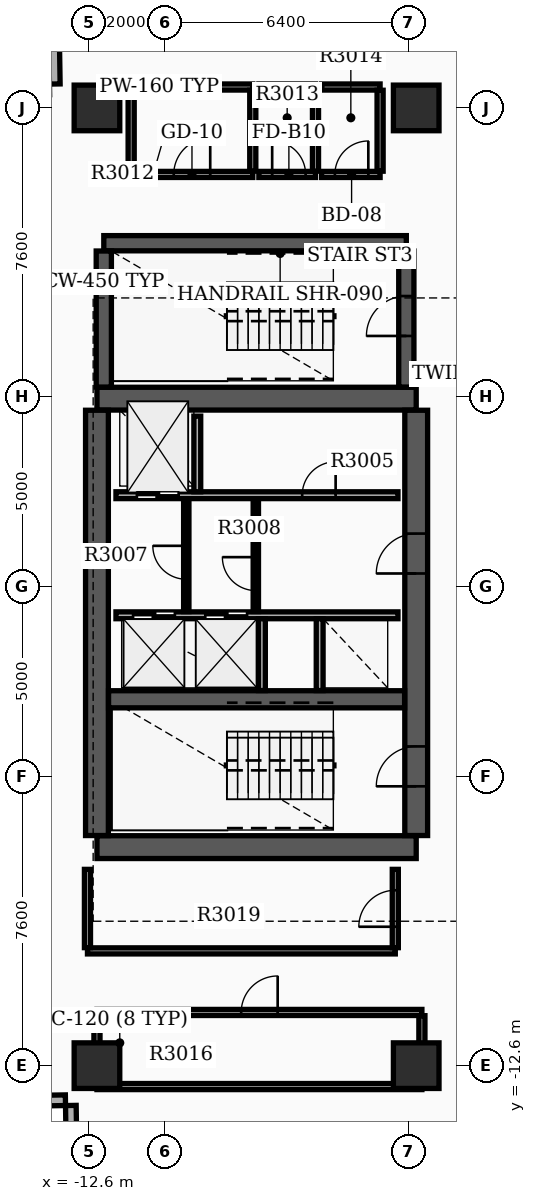
"""IFC4 building model, lengths in metres.
Left out: names, types, materials, properties, quantities, classifications, styles, units other than length and angle.
Written with IfcOpenShell. Run it as: python <this file> out.ifc"""

import sys

from ifc_helpers import new_model, si_unit, direction, frame, frame_2d, origin, origin_2d, place, context, subcontext, project, spatial, rectangle, extrude, element, fill, save


model = new_model("IFC4")
c1 = context("Model", 3, precision=1e-05, world=origin(), true_north=direction((0.0, 1.0)))
c2 = subcontext(c1, "Body", "Model", "MODEL_VIEW")
j1 = project(units=[si_unit("LENGTHUNIT", "METRE"), si_unit("PLANEANGLEUNIT", "RADIAN")], contexts=[c1])
p1 = place(None, origin())
s1 = spatial("IfcSite", under=j1, at=p1, CompositionType="ELEMENT")
p2 = place(p1, origin())
s2 = spatial("IfcBuilding", under=s1, at=p2, CompositionType="ELEMENT")
p3 = place(p2, frame((0.0, 0.0, 187.8)))
s3 = spatial("IfcBuildingStorey", under=s2, at=p3, CompositionType="ELEMENT", Elevation=187.8)
for number, where, z_axis, x_axis in (
    (1, (-12.4, -6.85, 0.0), (0.0, 0.0, 1.0), (1.0, 0.0, 0.0)),
    (2, (-12.4, 4.95, 0.0), (0.0, 0.0, 1.0), (1.0, 0.0, 0.0)),
):
    element("IfcWall", number, at=place(p3, frame(where, z_axis=z_axis, x_axis=x_axis)), inside=s3, PredefinedType="SHEAR", context=c2, shape_type="SweptSolid", body=[
        extrude(rectangle(XDim=8.4, YDim=0.6, at=frame_2d((4.2, 0.0))), origin(), (0.0, 0.0, 1.0), 3.65),
    ])
p4 = place(p3, frame((-12.4, -6.545, 0.0), z_axis=(0.0, 0.0, 1.0), x_axis=(0.0, 1.0, 0.0)))
e3 = element("IfcWall", 3, at=p4, inside=s3, PredefinedType="SHEAR", context=c2, shape_type="SweptSolid", body=[
    extrude(rectangle(XDim=11.19, YDim=0.6, at=frame_2d((5.595, 0.0))), origin(), (0.0, 0.0, 1.0), 3.65),
])
p5 = place(p3, frame((-4.0, -6.545, 0.0), z_axis=(0.0, 0.0, 1.0), x_axis=(0.0, 1.0, 0.0)))
e4 = element("IfcWall", 4, at=p5, inside=s3, PredefinedType="SHEAR", context=c2, shape_type="SweptSolid", body=[
    extrude(rectangle(XDim=11.19, YDim=0.6, at=frame_2d((5.595, 0.0))), origin(), (0.0, 0.0, 1.0), 3.65),
])
p6 = place(p5, frame((1.295, 0.0, 0.0)))
e5 = element("IfcOpeningElement", 5, at=p6, cuts=e4, PredefinedType="OPENING", context=c2, shape_type="SweptSolid", body=[
    extrude(rectangle(XDim=1.05, YDim=2.15, at=frame_2d((0.525, 1.075))), frame((0.0, 0.31, 0.0), z_axis=(0.0, -1.0, 0.0), x_axis=(1.0, 0.0, 0.0)), (0.0, 0.0, 1.0), 0.62),
])
p7 = place(p5, frame((6.895, 0.0, 0.0)))
e6 = element("IfcOpeningElement", 6, at=p7, cuts=e4, PredefinedType="OPENING", context=c2, shape_type="SweptSolid", body=[
    extrude(rectangle(XDim=1.05, YDim=2.15, at=frame_2d((0.525, 1.075))), frame((0.0, 0.31, 0.0), z_axis=(0.0, -1.0, 0.0), x_axis=(1.0, 0.0, 0.0)), (0.0, 0.0, 1.0), 0.62),
])
p8 = place(p3, frame((-12.095, -2.96, 0.0), z_axis=(0.0, 0.0, 1.0), x_axis=(1.0, 0.0, 0.0)))
e7 = element("IfcWall", 7, at=p8, inside=s3, PredefinedType="SHEAR", context=c2, shape_type="SweptSolid", body=[
    extrude(rectangle(XDim=7.79, YDim=0.45, at=frame_2d((3.895, 0.0))), origin(), (0.0, 0.0, 1.0), 3.65),
])
p9 = place(p3, frame((-12.22, 9.04, 0.0), z_axis=(0.0, 0.0, 1.0), x_axis=(1.0, 0.0, 0.0)))
e8 = element("IfcWall", 8, at=p9, inside=s3, PredefinedType="SHEAR", context=c2, shape_type="SweptSolid", body=[
    extrude(rectangle(XDim=7.96, YDim=0.4, at=frame_2d((3.98, 0.0))), origin(), (0.0, 0.0, 1.0), 3.65),
])
p10 = place(p3, frame((-12.22, 5.255, 0.0), z_axis=(0.0, 0.0, 1.0), x_axis=(0.0, 1.0, 0.0)))
e9 = element("IfcWall", 9, at=p10, inside=s3, PredefinedType="SHEAR", context=c2, shape_type="SweptSolid", body=[
    extrude(rectangle(XDim=3.58, YDim=0.4, at=frame_2d((1.79, 0.0))), origin(), (0.0, 0.0, 1.0), 3.65),
])
p11 = place(p3, frame((-4.26, 5.255, 0.0), z_axis=(0.0, 0.0, 1.0), x_axis=(0.0, 1.0, 0.0)))
e10 = element("IfcWall", 10, at=p11, inside=s3, PredefinedType="SHEAR", context=c2, shape_type="SweptSolid", body=[
    extrude(rectangle(XDim=3.58, YDim=0.4, at=frame_2d((1.79, 0.0))), origin(), (0.0, 0.0, 1.0), 3.65),
])
p12 = place(p11, frame((1.345, 0.0, 0.0)))
e11 = element("IfcOpeningElement", 11, at=p12, cuts=e10, PredefinedType="OPENING", context=c2, shape_type="SweptSolid", body=[
    extrude(rectangle(XDim=1.05, YDim=2.15, at=frame_2d((0.525, 1.075))), frame((0.0, 0.21, 0.0), z_axis=(0.0, -1.0, 0.0), x_axis=(1.0, 0.0, 0.0)), (0.0, 0.0, 1.0), 0.42),
])
for number, where, z_axis, x_axis in (
    (12, (-12.4, -12.6, 0.0), (0.0, 0.0, 1.0), (1.0, 0.0, 0.0)),
    (13, (-12.4, 12.6, 0.0), (0.0, 0.0, 1.0), (1.0, 0.0, 0.0)),
    (14, (-4.0, -12.6, 0.0), (0.0, 0.0, 1.0), (1.0, 0.0, 0.0)),
    (15, (-4.0, 12.6, 0.0), (0.0, 0.0, 1.0), (1.0, 0.0, 0.0)),
):
    element("IfcColumn", number, at=place(p3, frame(where, z_axis=z_axis, x_axis=x_axis)), inside=s3, PredefinedType="COLUMN", context=c2, shape_type="SweptSolid", body=[
        extrude(rectangle(XDim=1.2, YDim=1.2, at=origin_2d()), origin(), (0.0, 0.0, 1.0), 3.9),
    ])
p13 = place(p3, frame((-13.51, 13.229, 0.0), z_axis=(0.0, 0.0, 1.0), x_axis=(-0.015625635615, 0.999877912303, 0.0)))
e16 = element("IfcWall", 16, at=p13, inside=s3, PredefinedType="STANDARD", context=c2, shape_type="SweptSolid", body=[
    extrude(rectangle(XDim=1.5, YDim=0.28, at=frame_2d((0.75, 0.0))), origin(), (0.0, 0.0, 1.0), 2.92),
])
p14 = place(p3, frame((-14.449, -13.529, 0.0), z_axis=(0.0, 0.0, 1.0), x_axis=(0.999878147354, 0.015610587569, 0.0)))
e17 = element("IfcWall", 17, at=p14, inside=s3, PredefinedType="STANDARD", context=c2, shape_type="SweptSolid", body=[
    extrude(rectangle(XDim=1.22, YDim=0.28, at=frame_2d((0.61, 0.0))), origin(), (0.0, 0.0, 1.0), 2.92),
])
p15 = place(p3, frame((-13.087, -13.647, 0.0), z_axis=(0.0, 0.0, 1.0), x_axis=(0.015785793208, -0.999875396603, 0.0)))
e18 = element("IfcWall", 18, at=p15, inside=s3, PredefinedType="STANDARD", context=c2, shape_type="SweptSolid", body=[
    extrude(rectangle(XDim=1.5, YDim=0.28, at=frame_2d((0.75, 0.0))), origin(), (0.0, 0.0, 1.0), 2.92),
])
p16 = place(p3, frame((-11.9, 2.41, 0.0), z_axis=(0.0, 0.0, 1.0), x_axis=(1.0, 0.0, 0.0)))
e19 = element("IfcWall", 19, at=p16, inside=s3, PredefinedType="SOLIDWALL", context=c2, shape_type="SweptSolid", body=[
    extrude(rectangle(XDim=7.42, YDim=0.18, at=frame_2d((3.71, 0.0))), origin(), (0.0, 0.0, 1.0), 2.91),
])
p17 = place(p16, frame((0.55, 0.0, 0.0)))
e20 = element("IfcOpeningElement", 20, at=p17, cuts=e19, PredefinedType="OPENING", context=c2, shape_type="SweptSolid", body=[
    extrude(rectangle(XDim=1.1, YDim=2.15, at=frame_2d((0.55, 1.075))), frame((0.0, 0.1, 0.0), z_axis=(0.0, -1.0, 0.0), x_axis=(1.0, 0.0, 0.0)), (0.0, 0.0, 1.0), 0.2),
])
p18 = place(p16, frame((4.9, 0.0, 0.0)))
e21 = element("IfcOpeningElement", 21, at=p18, cuts=e19, PredefinedType="OPENING", context=c2, shape_type="SweptSolid", body=[
    extrude(rectangle(XDim=0.88, YDim=2.1, at=frame_2d((0.44, 1.05))), frame((0.0, 0.1, 0.0), z_axis=(0.0, -1.0, 0.0), x_axis=(1.0, 0.0, 0.0)), (0.0, 0.0, 1.0), 0.2),
])
p19 = place(p3, frame((-11.9, -0.75, 0.0), z_axis=(0.0, 0.0, 1.0), x_axis=(1.0, 0.0, 0.0)))
e22 = element("IfcWall", 22, at=p19, inside=s3, PredefinedType="SOLIDWALL", context=c2, shape_type="SweptSolid", body=[
    extrude(rectangle(XDim=7.42, YDim=0.18, at=frame_2d((3.71, 0.0))), origin(), (0.0, 0.0, 1.0), 2.91),
])
p20 = place(p19, frame((0.45, 0.0, 0.0)))
e23 = element("IfcOpeningElement", 23, at=p20, cuts=e22, PredefinedType="OPENING", context=c2, shape_type="SweptSolid", body=[
    extrude(rectangle(XDim=1.1, YDim=2.15, at=frame_2d((0.55, 1.075))), frame((0.0, 0.1, 0.0), z_axis=(0.0, -1.0, 0.0), x_axis=(1.0, 0.0, 0.0)), (0.0, 0.0, 1.0), 0.2),
])
p21 = place(p19, frame((2.35, 0.0, 0.0)))
e24 = element("IfcOpeningElement", 24, at=p21, cuts=e22, PredefinedType="OPENING", context=c2, shape_type="SweptSolid", body=[
    extrude(rectangle(XDim=1.1, YDim=2.15, at=frame_2d((0.55, 1.075))), frame((0.0, 0.1, 0.0), z_axis=(0.0, -1.0, 0.0), x_axis=(1.0, 0.0, 0.0)), (0.0, 0.0, 1.0), 0.2),
])
p22 = place(p3, frame((-9.76, 2.5, 0.0), z_axis=(0.0, 0.0, 1.0), x_axis=(0.0, 1.0, 0.0)))
e25 = element("IfcWall", 25, at=p22, inside=s3, PredefinedType="SOLIDWALL", context=c2, shape_type="SweptSolid", body=[
    extrude(rectangle(XDim=1.99, YDim=0.18, at=frame_2d((0.995, 0.0))), origin(), (0.0, 0.0, 1.0), 2.91),
])
for number, where, z_axis, x_axis in (
    (26, (-8.06, -2.73, 0.0), (0.0, 0.0, 1.0), (0.0, 1.0, 0.0)),
    (27, (-6.54, -2.73, 0.0), (0.0, 0.0, 1.0), (0.0, 1.0, 0.0)),
):
    element("IfcWall", number, at=place(p3, frame(where, z_axis=z_axis, x_axis=x_axis)), inside=s3, PredefinedType="SOLIDWALL", context=c2, shape_type="SweptSolid", body=[
        extrude(rectangle(XDim=1.89, YDim=0.18, at=frame_2d((0.945, 0.0))), origin(), (0.0, 0.0, 1.0), 2.91),
    ])
p23 = place(p3, frame((-8.22, -0.65, 0.0), z_axis=(0.0, 0.0, 1.0), x_axis=(0.0, 1.0, 0.0)))
e28 = element("IfcWall", 28, at=p23, inside=s3, PredefinedType="SOLIDWALL", context=c2, shape_type="SweptSolid", body=[
    extrude(rectangle(XDim=2.96, YDim=0.14, at=frame_2d((1.48, 0.0))), origin(), (0.0, 0.0, 1.0), 2.91),
])
p24 = place(p23, frame((0.55, 0.0, 0.0)))
e29 = element("IfcOpeningElement", 29, at=p24, cuts=e28, PredefinedType="OPENING", context=c2, shape_type="SweptSolid", body=[
    extrude(rectangle(XDim=0.88, YDim=2.1, at=frame_2d((0.44, 1.05))), frame((0.0, 0.08, 0.0), z_axis=(0.0, -1.0, 0.0), x_axis=(1.0, 0.0, 0.0)), (0.0, 0.0, 1.0), 0.16),
])
p25 = place(p3, frame((-10.05, -0.652, 0.0), z_axis=(0.0, 0.0, 1.0), x_axis=(0.0, 1.0, 0.0)))
e30 = element("IfcWall", 30, at=p25, inside=s3, PredefinedType="PARTITIONING", context=c2, shape_type="SweptSolid", body=[
    extrude(rectangle(XDim=2.962, YDim=0.14, at=frame_2d((1.481, 0.0))), origin(), (0.0, 0.0, 1.0), 2.91),
])
p26 = place(p25, frame((0.85, 0.0, 0.0)))
e31 = element("IfcOpeningElement", 31, at=p26, cuts=e30, PredefinedType="OPENING", context=c2, shape_type="SweptSolid", body=[
    extrude(rectangle(XDim=0.88, YDim=2.1, at=frame_2d((0.44, 1.05))), frame((0.0, 0.08, 0.0), z_axis=(0.0, -1.0, 0.0), x_axis=(1.0, 0.0, 0.0)), (0.0, 0.0, 1.0), 0.16),
])
p27 = place(p3, frame((-11.5, 10.85, 0.0), z_axis=(0.0, 0.0, 1.0), x_axis=(1.0, 0.0, 0.0)))
e32 = element("IfcWall", 32, at=p27, inside=s3, PredefinedType="PARTITIONING", context=c2, shape_type="SweptSolid", body=[
    extrude(rectangle(XDim=3.2, YDim=0.16, at=frame_2d((1.6, 0.0))), origin(), (0.0, 0.0, 1.0), 2.91),
])
p28 = place(p27, frame((1.12, 0.0, 0.0)))
e33 = element("IfcOpeningElement", 33, at=p28, cuts=e32, PredefinedType="OPENING", context=c2, shape_type="SweptSolid", body=[
    extrude(rectangle(XDim=0.96, YDim=2.15, at=frame_2d((0.48, 1.075))), frame((0.0, 0.09, 0.0), z_axis=(0.0, -1.0, 0.0), x_axis=(1.0, 0.0, 0.0)), (0.0, 0.0, 1.0), 0.18),
])
p29 = place(p3, frame((-11.5, 13.15, 0.0), z_axis=(0.0, 0.0, 1.0), x_axis=(1.0, 0.0, 0.0)))
e34 = element("IfcWall", 34, at=p29, inside=s3, PredefinedType="PARTITIONING", context=c2, shape_type="SweptSolid", body=[
    extrude(rectangle(XDim=3.2, YDim=0.16, at=frame_2d((1.6, 0.0))), origin(), (0.0, 0.0, 1.0), 2.91),
])
for number, where, z_axis, x_axis in (
    (35, (-11.5, 10.935, 0.0), (0.0, 0.0, 1.0), (0.0, 1.0, 0.0)),
    (36, (-8.3, 10.935, 0.0), (0.0, 0.0, 1.0), (0.0, 1.0, 0.0)),
):
    element("IfcWall", number, at=place(p3, frame(where, z_axis=z_axis, x_axis=x_axis)), inside=s3, PredefinedType="PARTITIONING", context=c2, shape_type="SweptSolid", body=[
        extrude(rectangle(XDim=2.13, YDim=0.16, at=frame_2d((1.065, 0.0))), origin(), (0.0, 0.0, 1.0), 2.91),
    ])
p30 = place(p3, frame((-8.14, 10.85, 0.0), z_axis=(0.0, 0.0, 1.0), x_axis=(1.0, 0.0, 0.0)))
e37 = element("IfcWall", 37, at=p30, inside=s3, PredefinedType="PARTITIONING", context=c2, shape_type="SweptSolid", body=[
    extrude(rectangle(XDim=1.49, YDim=0.16, at=frame_2d((0.745, 0.0))), origin(), (0.0, 0.0, 1.0), 2.91),
])
p31 = place(p30, frame((0.35, 0.0, 0.0)))
e38 = element("IfcOpeningElement", 38, at=p31, cuts=e37, PredefinedType="OPENING", context=c2, shape_type="SweptSolid", body=[
    extrude(rectangle(XDim=0.88, YDim=2.1, at=frame_2d((0.44, 1.05))), frame((0.0, 0.09, 0.0), z_axis=(0.0, -1.0, 0.0), x_axis=(1.0, 0.0, 0.0)), (0.0, 0.0, 1.0), 0.18),
])
p32 = place(p3, frame((-8.14, 13.15, 0.0), z_axis=(0.0, 0.0, 1.0), x_axis=(1.0, 0.0, 0.0)))
e39 = element("IfcWall", 39, at=p32, inside=s3, PredefinedType="PARTITIONING", context=c2, shape_type="SweptSolid", body=[
    extrude(rectangle(XDim=1.49, YDim=0.16, at=frame_2d((0.745, 0.0))), origin(), (0.0, 0.0, 1.0), 2.91),
])
p33 = place(p3, frame((-6.65, 10.935, 0.0), z_axis=(0.0, 0.0, 1.0), x_axis=(0.0, 1.0, 0.0)))
e40 = element("IfcWall", 40, at=p33, inside=s3, PredefinedType="PARTITIONING", context=c2, shape_type="SweptSolid", body=[
    extrude(rectangle(XDim=2.13, YDim=0.16, at=frame_2d((1.065, 0.0))), origin(), (0.0, 0.0, 1.0), 2.91),
])
p34 = place(p3, frame((-6.49, 10.85, 0.0), z_axis=(0.0, 0.0, 1.0), x_axis=(1.0, 0.0, 0.0)))
e41 = element("IfcWall", 41, at=p34, inside=s3, PredefinedType="PARTITIONING", context=c2, shape_type="SweptSolid", body=[
    extrude(rectangle(XDim=1.54, YDim=0.16, at=frame_2d((0.77, 0.0))), origin(), (0.0, 0.0, 1.0), 2.91),
])
p35 = place(p34, frame((0.35, 0.0, 0.0)))
e42 = element("IfcOpeningElement", 42, at=p35, cuts=e41, PredefinedType="OPENING", context=c2, shape_type="SweptSolid", body=[
    extrude(rectangle(XDim=0.88, YDim=2.15, at=frame_2d((0.44, 1.075))), frame((0.0, 0.09, 0.0), z_axis=(0.0, -1.0, 0.0), x_axis=(1.0, 0.0, 0.0)), (0.0, 0.0, 1.0), 0.18),
])
p36 = place(p3, frame((-6.49, 13.15, 0.0), z_axis=(0.0, 0.0, 1.0), x_axis=(1.0, 0.0, 0.0)))
e43 = element("IfcWall", 43, at=p36, inside=s3, PredefinedType="PARTITIONING", context=c2, shape_type="SweptSolid", body=[
    extrude(rectangle(XDim=1.54, YDim=0.16, at=frame_2d((0.77, 0.0))), origin(), (0.0, 0.0, 1.0), 2.91),
])
p37 = place(p3, frame((-4.95, 10.935, 0.0), z_axis=(0.0, 0.0, 1.0), x_axis=(0.0, 1.0, 0.0)))
e44 = element("IfcWall", 44, at=p37, inside=s3, PredefinedType="PARTITIONING", context=c2, shape_type="SweptSolid", body=[
    extrude(rectangle(XDim=2.13, YDim=0.16, at=frame_2d((1.065, 0.0))), origin(), (0.0, 0.0, 1.0), 2.91),
])
p38 = place(p3, frame((-12.4, -13.15, 0.0), z_axis=(0.0, 0.0, 1.0), x_axis=(1.0, 0.0, 0.0)))
e45 = element("IfcWall", 45, at=p38, inside=s3, PredefinedType="PARTITIONING", context=c2, shape_type="SweptSolid", body=[
    extrude(rectangle(XDim=8.55, YDim=0.16, at=frame_2d((4.275, 0.0))), origin(), (0.0, 0.0, 1.0), 2.91),
])
p39 = place(p3, frame((-12.4, -11.2, 0.0), z_axis=(0.0, 0.0, 1.0), x_axis=(1.0, 0.0, 0.0)))
e46 = element("IfcWall", 46, at=p39, inside=s3, PredefinedType="PARTITIONING", context=c2, shape_type="SweptSolid", body=[
    extrude(rectangle(XDim=8.55, YDim=0.16, at=frame_2d((4.275, 0.0))), origin(), (0.0, 0.0, 1.0), 2.91),
])
p40 = place(p39, frame((3.795, 0.0, 0.0)))
e47 = element("IfcOpeningElement", 47, at=p40, cuts=e46, PredefinedType="OPENING", context=c2, shape_type="SweptSolid", body=[
    extrude(rectangle(XDim=0.96, YDim=2.15, at=frame_2d((0.48, 1.075))), frame((0.0, 0.09, 0.0), z_axis=(0.0, -1.0, 0.0), x_axis=(1.0, 0.0, 0.0)), (0.0, 0.0, 1.0), 0.18),
])
for number, where, z_axis, x_axis in (
    (48, (-12.4, -13.065, 0.0), (0.0, 0.0, 1.0), (0.0, 1.0, 0.0)),
    (49, (-3.85, -13.065, 0.0), (0.0, 0.0, 1.0), (0.0, 1.0, 0.0)),
):
    element("IfcWall", number, at=place(p3, frame(where, z_axis=z_axis, x_axis=x_axis)), inside=s3, PredefinedType="PARTITIONING", context=c2, shape_type="SweptSolid", body=[
        extrude(rectangle(XDim=1.78, YDim=0.16, at=frame_2d((0.89, 0.0))), origin(), (0.0, 0.0, 1.0), 2.91),
    ])
p41 = place(p3, frame((-12.65, -9.58, 0.0), z_axis=(0.0, 0.0, 1.0), x_axis=(1.0, 0.0, 0.0)))
e50 = element("IfcWall", 50, at=p41, inside=s3, PredefinedType="PARTITIONING", context=c2, shape_type="SweptSolid", body=[
    extrude(rectangle(XDim=8.1, YDim=0.16, at=frame_2d((4.05, 0.0))), origin(), (0.0, 0.0, 1.0), 2.91),
])
p42 = place(p3, frame((-12.65, -9.495, 0.0), z_axis=(0.0, 0.0, 1.0), x_axis=(0.0, 1.0, 0.0)))
e51 = element("IfcWall", 51, at=p42, inside=s3, PredefinedType="PARTITIONING", context=c2, shape_type="SweptSolid", body=[
    extrude(rectangle(XDim=2.06, YDim=0.16, at=frame_2d((1.03, 0.0))), origin(), (0.0, 0.0, 1.0), 2.91),
])
p43 = place(p3, frame((-4.55, -9.495, 0.0), z_axis=(0.0, 0.0, 1.0), x_axis=(0.0, 1.0, 0.0)))
e52 = element("IfcWall", 52, at=p43, inside=s3, PredefinedType="PARTITIONING", context=c2, shape_type="SweptSolid", body=[
    extrude(rectangle(XDim=2.06, YDim=0.16, at=frame_2d((1.03, 0.0))), origin(), (0.0, 0.0, 1.0), 2.91),
])
p44 = place(p43, frame((0.55, 0.0, 0.0)))
e53 = element("IfcOpeningElement", 53, at=p44, cuts=e52, PredefinedType="OPENING", context=c2, shape_type="SweptSolid", body=[
    extrude(rectangle(XDim=0.96, YDim=2.15, at=frame_2d((0.48, 1.075))), frame((0.0, 0.09, 0.0), z_axis=(0.0, -1.0, 0.0), x_axis=(1.0, 0.0, 0.0)), (0.0, 0.0, 1.0), 0.18),
])
p45 = place(p6, origin())
e54 = element("IfcDoor", 54, at=p45, inside=s3, OperationType="SINGLE_SWING_LEFT", PredefinedType="DOOR", context=c2, shape_type="SweptSolid", body=[
    extrude(rectangle(XDim=1.05, YDim=2.15, at=frame_2d((0.525, 1.075))), frame((0.0, 0.025, 0.0), z_axis=(0.0, -1.0, 0.0), x_axis=(1.0, 0.0, 0.0)), (0.0, 0.0, 1.0), 0.05),
])
fill(e5, e54)
p46 = place(p7, origin())
e55 = element("IfcDoor", 55, at=p46, inside=s3, OperationType="SINGLE_SWING_LEFT", PredefinedType="DOOR", context=c2, shape_type="SweptSolid", body=[
    extrude(rectangle(XDim=1.05, YDim=2.15, at=frame_2d((0.525, 1.075))), frame((0.0, 0.025, 0.0), z_axis=(0.0, -1.0, 0.0), x_axis=(1.0, 0.0, 0.0)), (0.0, 0.0, 1.0), 0.05),
])
fill(e6, e55)
p47 = place(p12, origin())
e56 = element("IfcDoor", 56, at=p47, inside=s3, OperationType="SINGLE_SWING_LEFT", PredefinedType="DOOR", context=c2, shape_type="SweptSolid", body=[
    extrude(rectangle(XDim=1.05, YDim=2.15, at=frame_2d((0.525, 1.075))), frame((0.0, 0.025, 0.0), z_axis=(0.0, -1.0, 0.0), x_axis=(1.0, 0.0, 0.0)), (0.0, 0.0, 1.0), 0.05),
])
fill(e11, e56)
p48 = place(p17, origin())
e57 = element("IfcDoor", 57, at=p48, inside=s3, OperationType="DOUBLE_DOOR_SLIDING", PredefinedType="DOOR", context=c2, shape_type="SweptSolid", body=[
    extrude(rectangle(XDim=1.1, YDim=2.15, at=frame_2d((0.55, 1.075))), frame((0.0, 0.025, 0.0), z_axis=(0.0, -1.0, 0.0), x_axis=(1.0, 0.0, 0.0)), (0.0, 0.0, 1.0), 0.05),
])
fill(e20, e57)
p49 = place(p20, origin())
e58 = element("IfcDoor", 58, at=p49, inside=s3, OperationType="DOUBLE_DOOR_SLIDING", PredefinedType="DOOR", context=c2, shape_type="SweptSolid", body=[
    extrude(rectangle(XDim=1.1, YDim=2.15, at=frame_2d((0.55, 1.075))), frame((0.0, 0.025, 0.0), z_axis=(0.0, -1.0, 0.0), x_axis=(1.0, 0.0, 0.0)), (0.0, 0.0, 1.0), 0.05),
])
fill(e23, e58)
p50 = place(p21, origin())
e59 = element("IfcDoor", 59, at=p50, inside=s3, OperationType="DOUBLE_DOOR_SLIDING", PredefinedType="DOOR", context=c2, shape_type="SweptSolid", body=[
    extrude(rectangle(XDim=1.1, YDim=2.15, at=frame_2d((0.55, 1.075))), frame((0.0, 0.025, 0.0), z_axis=(0.0, -1.0, 0.0), x_axis=(1.0, 0.0, 0.0)), (0.0, 0.0, 1.0), 0.05),
])
fill(e24, e59)
p51 = place(p18, origin())
e60 = element("IfcDoor", 60, at=p51, inside=s3, OperationType="SINGLE_SWING_RIGHT", PredefinedType="DOOR", context=c2, shape_type="SweptSolid", body=[
    extrude(rectangle(XDim=0.88, YDim=2.1, at=frame_2d((0.44, 1.05))), frame((0.0, 0.025, 0.0), z_axis=(0.0, -1.0, 0.0), x_axis=(1.0, 0.0, 0.0)), (0.0, 0.0, 1.0), 0.05),
])
fill(e21, e60)
p52 = place(p24, origin())
e61 = element("IfcDoor", 61, at=p52, inside=s3, OperationType="SINGLE_SWING_RIGHT", PredefinedType="DOOR", context=c2, shape_type="SweptSolid", body=[
    extrude(rectangle(XDim=0.88, YDim=2.1, at=frame_2d((0.44, 1.05))), frame((0.0, 0.025, 0.0), z_axis=(0.0, -1.0, 0.0), x_axis=(1.0, 0.0, 0.0)), (0.0, 0.0, 1.0), 0.05),
])
fill(e29, e61)
p53 = place(p26, origin())
e62 = element("IfcDoor", 62, at=p53, inside=s3, OperationType="SINGLE_SWING_RIGHT", PredefinedType="DOOR", context=c2, shape_type="SweptSolid", body=[
    extrude(rectangle(XDim=0.88, YDim=2.1, at=frame_2d((0.44, 1.05))), frame((0.0, 0.025, 0.0), z_axis=(0.0, -1.0, 0.0), x_axis=(1.0, 0.0, 0.0)), (0.0, 0.0, 1.0), 0.05),
])
fill(e31, e62)
p54 = place(p28, origin())
e63 = element("IfcDoor", 63, at=p54, inside=s3, OperationType="SINGLE_SWING_RIGHT", PredefinedType="DOOR", context=c2, shape_type="SweptSolid", body=[
    extrude(rectangle(XDim=0.96, YDim=2.15, at=frame_2d((0.48, 1.075))), frame((0.0, 0.025, 0.0), z_axis=(0.0, -1.0, 0.0), x_axis=(1.0, 0.0, 0.0)), (0.0, 0.0, 1.0), 0.05),
])
fill(e33, e63)
p55 = place(p31, origin())
e64 = element("IfcDoor", 64, at=p55, inside=s3, OperationType="SINGLE_SWING_LEFT", PredefinedType="DOOR", context=c2, shape_type="SweptSolid", body=[
    extrude(rectangle(XDim=0.88, YDim=2.1, at=frame_2d((0.44, 1.05))), frame((0.0, 0.025, 0.0), z_axis=(0.0, -1.0, 0.0), x_axis=(1.0, 0.0, 0.0)), (0.0, 0.0, 1.0), 0.05),
])
fill(e38, e64)
p56 = place(p35, origin())
e65 = element("IfcDoor", 65, at=p56, inside=s3, OperationType="SINGLE_SWING_RIGHT", PredefinedType="DOOR", context=c2, shape_type="SweptSolid", body=[
    extrude(rectangle(XDim=0.88, YDim=2.15, at=frame_2d((0.44, 1.075))), frame((0.0, 0.025, 0.0), z_axis=(0.0, -1.0, 0.0), x_axis=(1.0, 0.0, 0.0)), (0.0, 0.0, 1.0), 0.05),
])
fill(e42, e65)
p57 = place(p40, origin())
e66 = element("IfcDoor", 66, at=p57, inside=s3, OperationType="SINGLE_SWING_RIGHT", PredefinedType="DOOR", context=c2, shape_type="SweptSolid", body=[
    extrude(rectangle(XDim=0.96, YDim=2.15, at=frame_2d((0.48, 1.075))), frame((0.0, 0.025, 0.0), z_axis=(0.0, -1.0, 0.0), x_axis=(1.0, 0.0, 0.0)), (0.0, 0.0, 1.0), 0.05),
])
fill(e47, e66)
p58 = place(p44, origin())
e67 = element("IfcDoor", 67, at=p58, inside=s3, OperationType="SINGLE_SWING_LEFT", PredefinedType="DOOR", context=c2, shape_type="SweptSolid", body=[
    extrude(rectangle(XDim=0.96, YDim=2.15, at=frame_2d((0.48, 1.075))), frame((0.0, 0.025, 0.0), z_axis=(0.0, -1.0, 0.0), x_axis=(1.0, 0.0, 0.0)), (0.0, 0.0, 1.0), 0.05),
])
fill(e53, e67)
save(model, sys.argv[1])
